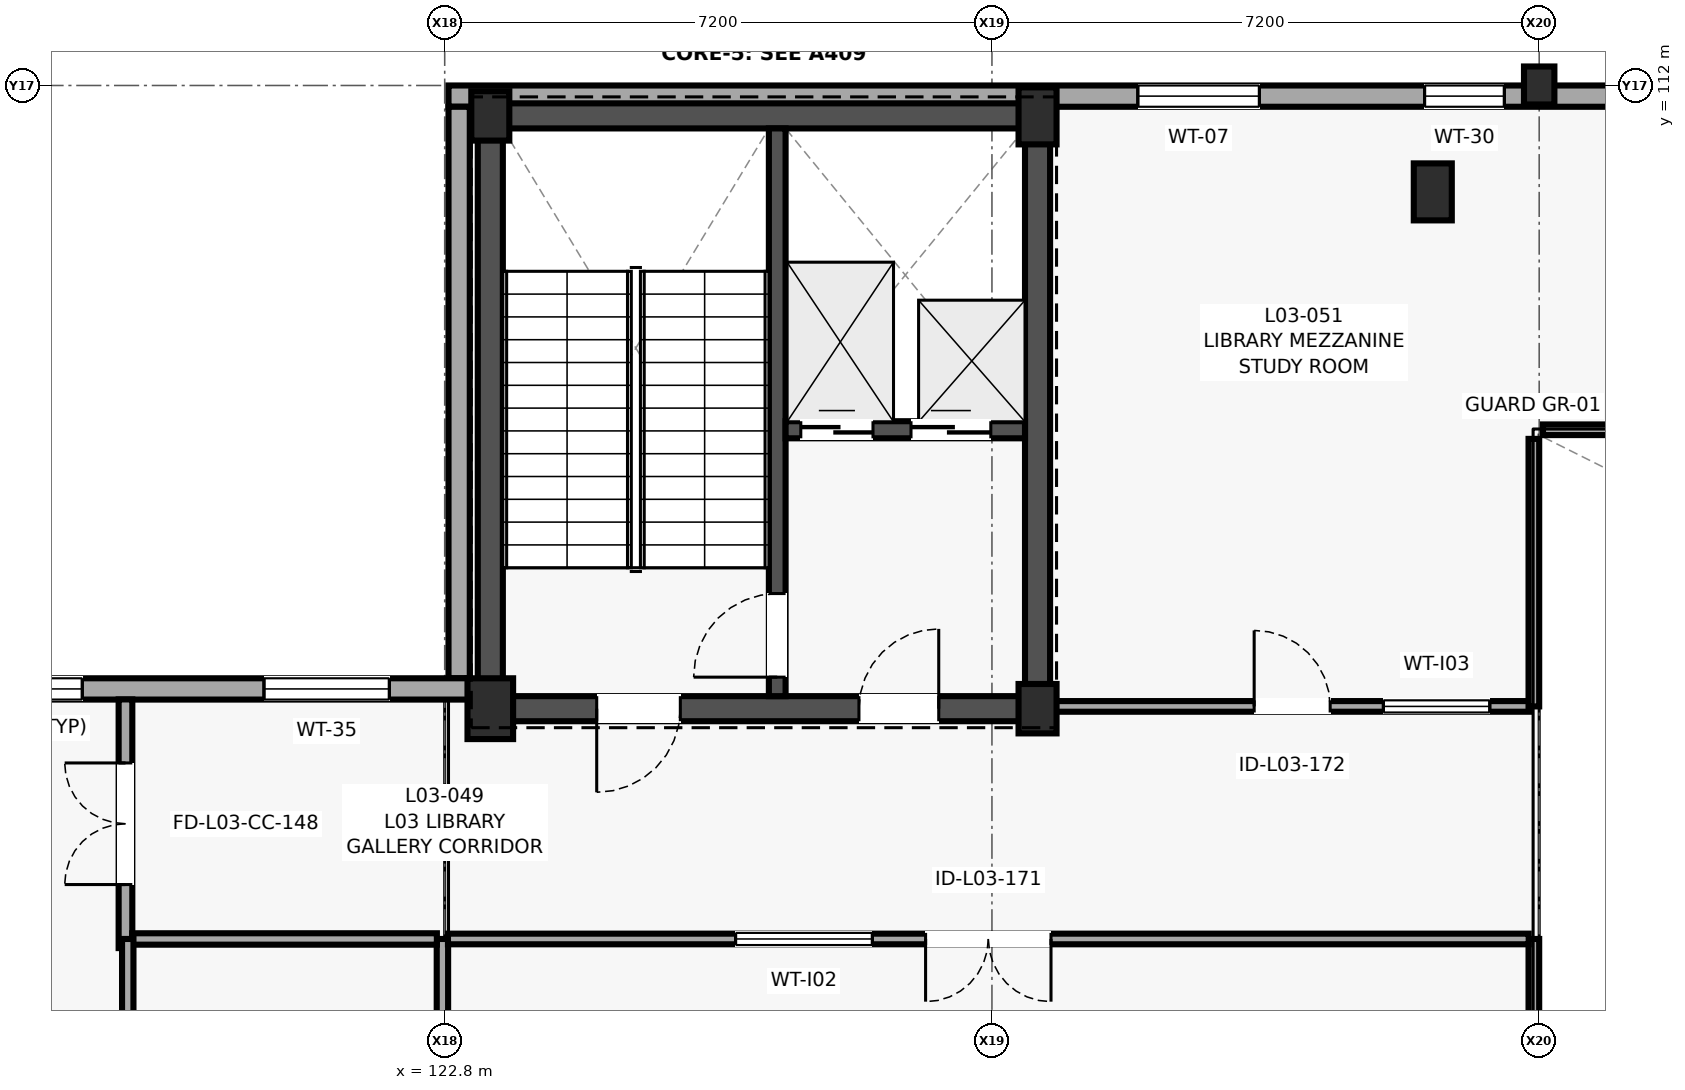
"""IFC4 building model, lengths in metres.
Left out: names, types, materials, properties, quantities, classifications, styles, units other than length and angle.
Written with IfcOpenShell. Run it as: python <this file> out.ifc"""

import sys

from ifc_helpers import new_model, si_unit, direction, frame, frame_2d, origin, origin_2d, place, context, subcontext, project, spatial, rectangle, extrude, element, fill, save


model = new_model("IFC4")
c1 = context("Model", 3, precision=1e-05, world=origin(), true_north=direction((0.0, 1.0)))
c2 = subcontext(c1, "Body", "Model", "MODEL_VIEW")
j1 = project(units=[si_unit("LENGTHUNIT", "METRE"), si_unit("PLANEANGLEUNIT", "RADIAN")], contexts=[c1])
p1 = place(None, origin())
s1 = spatial("IfcSite", under=j1, at=p1, CompositionType="ELEMENT")
p2 = place(p1, origin())
s2 = spatial("IfcBuilding", under=s1, at=p2, CompositionType="ELEMENT")
p3 = place(p2, frame((0.0, 0.0, 12.2)))
s3 = spatial("IfcBuildingStorey", under=s2, at=p3, CompositionType="ELEMENT", Elevation=12.2)
p4 = place(p3, frame((123.4, 103.8, 0.0), z_axis=(0.0, 0.0, 1.0), x_axis=(1.0, 0.0, 0.0)))
e1 = element("IfcColumn", 1, at=p4, inside=s3, PredefinedType="COLUMN", context=c2, shape_type="SweptSolid", body=[
    extrude(rectangle(XDim=0.6, YDim=0.8, at=origin_2d()), origin(), (0.0, 0.0, 1.0), 4.0),
])
for number, where, z_axis, x_axis in (
    (2, (123.4, 111.6, 0.0), (0.0, 0.0, 1.0), (1.0, 0.0, 0.0)),
    (3, (130.6, 103.8, 0.0), (0.0, 0.0, 1.0), (1.0, 0.0, 0.0)),
):
    element("IfcColumn", number, at=place(p3, frame(where, z_axis=z_axis, x_axis=x_axis)), inside=s3, PredefinedType="COLUMN", context=c2, shape_type="SweptSolid", body=[
        extrude(rectangle(XDim=0.5, YDim=0.65, at=origin_2d()), origin(), (0.0, 0.0, 1.0), 4.0),
    ])
for number, where, z_axis, x_axis in (
    (4, (130.6, 111.6, 0.0), (0.0, 0.0, 1.0), (1.0, 0.0, 0.0)),
    (5, (135.8, 110.6, 0.0), (0.0, 0.0, 1.0), (1.0, 0.0, 0.0)),
):
    element("IfcColumn", number, at=place(p3, frame(where, z_axis=z_axis, x_axis=x_axis)), inside=s3, PredefinedType="COLUMN", context=c2, shape_type="SweptSolid", body=[
        extrude(rectangle(XDim=0.5, YDim=0.75, at=origin_2d()), origin(), (0.0, 0.0, 1.0), 4.0),
    ])
p5 = place(p3, frame((137.2, 112.0, 0.0), z_axis=(0.0, 0.0, 1.0), x_axis=(1.0, 0.0, 0.0)))
e6 = element("IfcColumn", 6, at=p5, inside=s3, PredefinedType="PILASTER", context=c2, shape_type="SweptSolid", body=[
    extrude(rectangle(XDim=0.4, YDim=0.5, at=origin_2d()), origin(), (0.0, 0.0, 1.0), 4.0),
])
p6 = place(p3, frame((138.641, 111.86, 0.0), z_axis=(0.0, 0.0, 1.0), x_axis=(-1.0, 0.0, 0.0)))
e7 = element("IfcWall", 7, at=p6, inside=s3, PredefinedType="SOLIDWALL", context=c2, shape_type="SweptSolid", body=[
    extrude(rectangle(XDim=15.791, YDim=0.28, at=frame_2d((7.896, 0.0))), origin(), (0.0, 0.0, 1.0), 3.115),
])
p7 = place(p6, frame((1.899, 0.0, 1.05)))
e8 = element("IfcOpeningElement", 8, at=p7, cuts=e7, PredefinedType="OPENING", context=c2, shape_type="SweptSolid", body=[
    extrude(rectangle(XDim=1.05, YDim=1.3, at=frame_2d((0.525, 0.65))), frame((0.0, 0.15, 0.0), z_axis=(0.0, -1.0, 0.0), x_axis=(1.0, 0.0, 0.0)), (0.0, 0.0, 1.0), 0.3),
])
p8 = place(p6, frame((5.122, 0.0, 1.05)))
e9 = element("IfcOpeningElement", 9, at=p8, cuts=e7, PredefinedType="OPENING", context=c2, shape_type="SweptSolid", body=[
    extrude(rectangle(XDim=1.6, YDim=1.35, at=frame_2d((0.8, 0.675))), frame((0.0, 0.15, 0.0), z_axis=(0.0, -1.0, 0.0), x_axis=(1.0, 0.0, 0.0)), (0.0, 0.0, 1.0), 0.3),
])
p9 = place(p3, frame((122.99, 111.72, 0.0), z_axis=(0.0, 0.0, 1.0), x_axis=(0.0, -1.0, 0.0)))
e10 = element("IfcWall", 10, at=p9, inside=s3, PredefinedType="SOLIDWALL", context=c2, shape_type="SweptSolid", body=[
    extrude(rectangle(XDim=7.52, YDim=0.28, at=frame_2d((3.76, 0.0))), origin(), (0.0, 0.0, 1.0), 3.78),
])
p10 = place(p3, frame((123.13, 104.06, 0.0), z_axis=(0.0, 0.0, 1.0), x_axis=(-1.0, 0.0, 0.0)))
e11 = element("IfcWall", 11, at=p10, inside=s3, PredefinedType="SOLIDWALL", context=c2, shape_type="SweptSolid", body=[
    extrude(rectangle(XDim=7.53, YDim=0.28, at=frame_2d((3.765, 0.0))), origin(), (0.0, 0.0, 1.0), 3.78),
])
p11 = place(p10, frame((1.058, 0.0, 1.05)))
e12 = element("IfcOpeningElement", 12, at=p11, cuts=e11, PredefinedType="OPENING", context=c2, shape_type="SweptSolid", body=[
    extrude(rectangle(XDim=1.65, YDim=1.25, at=frame_2d((0.825, 0.625))), frame((0.0, 0.15, 0.0), z_axis=(0.0, -1.0, 0.0), x_axis=(1.0, 0.0, 0.0)), (0.0, 0.0, 1.0), 0.3),
])
p12 = place(p10, frame((5.098, 0.0, 0.75)))
e13 = element("IfcOpeningElement", 13, at=p12, cuts=e11, PredefinedType="OPENING", context=c2, shape_type="SweptSolid", body=[
    extrude(rectangle(XDim=1.1, YDim=2.1, at=frame_2d((0.55, 1.05))), frame((0.0, 0.15, 0.0), z_axis=(0.0, -1.0, 0.0), x_axis=(1.0, 0.0, 0.0)), (0.0, 0.0, 1.0), 0.3),
])
p13 = place(p3, frame((123.235, 103.8, 0.0), z_axis=(0.0, 0.0, 1.0), x_axis=(1.0, 0.0, 0.0)))
e14 = element("IfcWall", 14, at=p13, inside=s3, PredefinedType="SHEAR", context=c2, shape_type="SweptSolid", body=[
    extrude(rectangle(XDim=7.53, YDim=0.33, at=frame_2d((3.765, 0.0))), origin(), (0.0, 0.0, 1.0), 3.78),
])
p14 = place(p13, frame((5.015, 0.0, 0.0)))
e15 = element("IfcOpeningElement", 15, at=p14, cuts=e14, PredefinedType="OPENING", context=c2, shape_type="SweptSolid", body=[
    extrude(rectangle(XDim=1.05, YDim=2.15, at=frame_2d((0.525, 1.075))), frame((0.0, 0.175, 0.0), z_axis=(0.0, -1.0, 0.0), x_axis=(1.0, 0.0, 0.0)), (0.0, 0.0, 1.0), 0.35),
])
p15 = place(p13, frame((1.565, 0.0, 0.0)))
e16 = element("IfcOpeningElement", 16, at=p15, cuts=e14, PredefinedType="OPENING", context=c2, shape_type="SweptSolid", body=[
    extrude(rectangle(XDim=1.1, YDim=2.15, at=frame_2d((0.55, 1.075))), frame((0.0, 0.175, 0.0), z_axis=(0.0, -1.0, 0.0), x_axis=(1.0, 0.0, 0.0)), (0.0, 0.0, 1.0), 0.35),
])
p16 = place(p3, frame((123.235, 111.6, 0.0), z_axis=(0.0, 0.0, 1.0), x_axis=(1.0, 0.0, 0.0)))
e17 = element("IfcWall", 17, at=p16, inside=s3, PredefinedType="SHEAR", context=c2, shape_type="SweptSolid", body=[
    extrude(rectangle(XDim=7.53, YDim=0.33, at=frame_2d((3.765, 0.0))), origin(), (0.0, 0.0, 1.0), 3.78),
])
for number, where, z_axis, x_axis in (
    (18, (123.4, 103.965, 0.0), (0.0, 0.0, 1.0), (0.0, 1.0, 0.0)),
    (19, (130.6, 103.965, 0.0), (0.0, 0.0, 1.0), (0.0, 1.0, 0.0)),
):
    element("IfcWall", number, at=place(p3, frame(where, z_axis=z_axis, x_axis=x_axis)), inside=s3, PredefinedType="SHEAR", context=c2, shape_type="SweptSolid", body=[
        extrude(rectangle(XDim=7.47, YDim=0.33, at=frame_2d((3.735, 0.0))), origin(), (0.0, 0.0, 1.0), 3.78),
    ])
p17 = place(p3, frame((127.175, 103.965, 0.0), z_axis=(0.0, 0.0, 1.0), x_axis=(0.0, 1.0, 0.0)))
e20 = element("IfcWall", 20, at=p17, inside=s3, PredefinedType="SHEAR", context=c2, shape_type="SweptSolid", body=[
    extrude(rectangle(XDim=7.47, YDim=0.22, at=frame_2d((3.735, 0.0))), origin(), (0.0, 0.0, 1.0), 3.78),
])
p18 = place(p17, frame((0.25, 0.0, 0.0)))
e21 = element("IfcOpeningElement", 21, at=p18, cuts=e20, PredefinedType="OPENING", context=c2, shape_type="SweptSolid", body=[
    extrude(rectangle(XDim=1.1, YDim=2.15, at=frame_2d((0.55, 1.075))), frame((0.0, 0.12, 0.0), z_axis=(0.0, -1.0, 0.0), x_axis=(1.0, 0.0, 0.0)), (0.0, 0.0, 1.0), 0.24),
])
p19 = place(p3, frame((127.285, 107.47, 0.0), z_axis=(0.0, 0.0, 1.0), x_axis=(1.0, 0.0, 0.0)))
e22 = element("IfcWall", 22, at=p19, inside=s3, PredefinedType="SHEAR", context=c2, shape_type="SweptSolid", body=[
    extrude(rectangle(XDim=3.15, YDim=0.225, at=frame_2d((1.575, 0.0))), origin(), (0.0, 0.0, 1.0), 3.78),
])
p20 = place(p19, frame((0.2, 0.0, 0.0)))
e23 = element("IfcOpeningElement", 23, at=p20, cuts=e22, PredefinedType="OPENING", context=c2, shape_type="SweptSolid", body=[
    extrude(rectangle(XDim=0.95, YDim=2.15, at=frame_2d((0.475, 1.075))), frame((0.0, 0.123, 0.0), z_axis=(0.0, -1.0, 0.0), x_axis=(1.0, 0.0, 0.0)), (0.0, 0.0, 1.0), 0.245),
])
p21 = place(p19, frame((1.65, 0.0, 0.0)))
e24 = element("IfcOpeningElement", 24, at=p21, cuts=e22, PredefinedType="OPENING", context=c2, shape_type="SweptSolid", body=[
    extrude(rectangle(XDim=1.05, YDim=2.2, at=frame_2d((0.525, 1.1))), frame((0.0, 0.123, 0.0), z_axis=(0.0, -1.0, 0.0), x_axis=(1.0, 0.0, 0.0)), (0.0, 0.0, 1.0), 0.245),
])
p22 = place(p3, frame((118.6, 100.65, 0.0), z_axis=(0.0, 0.0, 1.0), x_axis=(0.0, 1.0, 0.0)))
e25 = element("IfcWall", 25, at=p22, inside=s3, PredefinedType="PARTITIONING", context=c2, shape_type="SweptSolid", body=[
    extrude(rectangle(XDim=3.272, YDim=0.18, at=frame_2d((1.636, 0.0))), origin(), (0.0, 0.0, 1.0), 3.78),
])
p23 = place(p22, frame((0.836, 0.0, 0.0)))
e26 = element("IfcOpeningElement", 26, at=p23, cuts=e25, PredefinedType="OPENING", context=c2, shape_type="SweptSolid", body=[
    extrude(rectangle(XDim=1.6, YDim=2.25, at=frame_2d((0.8, 1.125))), frame((0.0, 0.1, 0.0), z_axis=(0.0, -1.0, 0.0), x_axis=(1.0, 0.0, 0.0)), (0.0, 0.0, 1.0), 0.2),
])
p24 = place(p3, frame((122.77, 96.678, 0.0), z_axis=(0.0, 0.0, 1.0), x_axis=(0.0, 1.0, 0.0)))
e27 = element("IfcWall", 27, at=p24, inside=s3, PredefinedType="PARTITIONING", context=c2, shape_type="SweptSolid", body=[
    extrude(rectangle(XDim=4.092, YDim=0.15, at=frame_2d((2.046, 0.0))), origin(), (0.0, 0.0, 1.0), 3.715),
])
p25 = place(p3, frame((122.697, 100.77, 0.0), z_axis=(0.0, 0.0, 1.0), x_axis=(-1.0, 0.0, 0.0)))
e28 = element("IfcWall", 28, at=p25, inside=s3, PredefinedType="PARTITIONING", context=c2, shape_type="SweptSolid", body=[
    extrude(rectangle(XDim=4.009, YDim=0.15, at=frame_2d((2.004, 0.0))), origin(), (0.0, 0.0, 1.0), 3.715),
])
p26 = place(p3, frame((118.63, 100.77, 0.0), z_axis=(0.0, 0.0, 1.0), x_axis=(0.0, -1.0, 0.0)))
e29 = element("IfcWall", 29, at=p26, inside=s3, PredefinedType="PARTITIONING", context=c2, shape_type="SweptSolid", body=[
    extrude(rectangle(XDim=10.922, YDim=0.15, at=frame_2d((5.461, 0.0))), origin(), (0.0, 0.0, 1.0), 3.165),
])
p27 = place(p26, frame((4.886, 0.0, 0.0)))
e30 = element("IfcOpeningElement", 30, at=p27, cuts=e29, PredefinedType="OPENING", context=c2, shape_type="SweptSolid", body=[
    extrude(rectangle(XDim=1.15, YDim=2.2, at=frame_2d((0.575, 1.1))), frame((0.0, 0.085, 0.0), z_axis=(0.0, -1.0, 0.0), x_axis=(1.0, 0.0, 0.0)), (0.0, 0.0, 1.0), 0.17),
])
p28 = place(p3, frame((137.13, 98.45, 0.0), z_axis=(0.0, 0.0, 1.0), x_axis=(0.0, 1.0, 0.0)))
e31 = element("IfcWall", 31, at=p28, inside=s3, PredefinedType="PARTITIONING", context=c2, shape_type="SweptSolid", body=[
    extrude(rectangle(XDim=2.32, YDim=0.14, at=frame_2d((1.16, 0.0))), origin(), (0.0, 0.0, 1.0), 3.165),
])
p29 = place(p3, frame((137.062, 100.77, 0.0), z_axis=(0.0, 0.0, 1.0), x_axis=(-1.0, 0.0, 0.0)))
e32 = element("IfcWall", 32, at=p29, inside=s3, PredefinedType="PARTITIONING", context=c2, shape_type="SweptSolid", body=[
    extrude(rectangle(XDim=14.219, YDim=0.14, at=frame_2d((7.109, 0.0))), origin(), (0.0, 0.0, 1.0), 3.715),
])
p30 = place(p29, frame((6.285, 0.0, 0.0)))
e33 = element("IfcOpeningElement", 33, at=p30, cuts=e32, PredefinedType="OPENING", context=c2, shape_type="SweptSolid", body=[
    extrude(rectangle(XDim=1.65, YDim=2.32, at=frame_2d((0.825, 1.16))), frame((0.0, 0.08, 0.0), z_axis=(0.0, -1.0, 0.0), x_axis=(1.0, 0.0, 0.0)), (0.0, 0.0, 1.0), 0.16),
])
p31 = place(p29, frame((8.635, 0.0, 1.05)))
e34 = element("IfcOpeningElement", 34, at=p31, cuts=e32, PredefinedType="OPENING", context=c2, shape_type="SweptSolid", body=[
    extrude(rectangle(XDim=1.8, YDim=1.2, at=frame_2d((0.9, 0.6))), frame((0.0, 0.08, 0.0), z_axis=(0.0, -1.0, 0.0), x_axis=(1.0, 0.0, 0.0)), (0.0, 0.0, 1.0), 0.16),
])
p32 = place(p3, frame((130.83, 103.83, 0.0), z_axis=(0.0, 0.0, 1.0), x_axis=(1.0, 0.0, 0.0)))
e35 = element("IfcWall", 35, at=p32, inside=s3, PredefinedType="PARTITIONING", context=c2, shape_type="SweptSolid", body=[
    extrude(rectangle(XDim=6.24, YDim=0.14, at=frame_2d((3.12, 0.0))), origin(), (0.0, 0.0, 1.0), 3.715),
])
p33 = place(p32, frame((2.62, 0.0, 0.0)))
e36 = element("IfcOpeningElement", 36, at=p33, cuts=e35, PredefinedType="OPENING", context=c2, shape_type="SweptSolid", body=[
    extrude(rectangle(XDim=1.0, YDim=2.1, at=frame_2d((0.5, 1.05))), frame((0.0, 0.08, 0.0), z_axis=(0.0, -1.0, 0.0), x_axis=(1.0, 0.0, 0.0)), (0.0, 0.0, 1.0), 0.16),
])
p34 = place(p32, frame((4.32, 0.0, 1.05)))
e37 = element("IfcOpeningElement", 37, at=p34, cuts=e35, PredefinedType="OPENING", context=c2, shape_type="SweptSolid", body=[
    extrude(rectangle(XDim=1.4, YDim=1.05, at=frame_2d((0.7, 0.525))), frame((0.0, 0.08, 0.0), z_axis=(0.0, -1.0, 0.0), x_axis=(1.0, 0.0, 0.0)), (0.0, 0.0, 1.0), 0.16),
])
p35 = place(p3, frame((137.13, 103.83, 0.0), z_axis=(0.0, 0.0, 1.0), x_axis=(0.0, 1.0, 0.0)))
e38 = element("IfcWall", 38, at=p35, inside=s3, PredefinedType="PARTITIONING", context=c2, shape_type="SweptSolid", body=[
    extrude(rectangle(XDim=3.52, YDim=0.14, at=frame_2d((1.76, 0.0))), origin(), (0.0, 0.0, 1.0), 3.165),
])
p36 = place(p3, frame((137.25, 107.47, 0.0), z_axis=(0.0, 0.0, 1.0), x_axis=(1.0, 0.0, 0.0)))
e39 = element("IfcWall", 39, at=p36, inside=s3, PredefinedType="PARTITIONING", context=c2, shape_type="SweptSolid", body=[
    extrude(rectangle(XDim=17.9, YDim=0.14, at=frame_2d((8.95, 0.0))), origin(), (0.0, 0.0, 1.0), 3.715),
])
p37 = place(p7, origin())
e40 = element("IfcWindow", 40, at=p37, inside=s3, PartitioningType="SINGLE_PANEL", PredefinedType="WINDOW", context=c2, shape_type="SweptSolid", body=[
    extrude(rectangle(XDim=1.05, YDim=1.3, at=frame_2d((0.525, 0.65))), frame((0.0, 0.03, 0.0), z_axis=(0.0, -1.0, 0.0), x_axis=(1.0, 0.0, 0.0)), (0.0, 0.0, 1.0), 0.06),
])
fill(e8, e40)
p38 = place(p8, origin())
e41 = element("IfcWindow", 41, at=p38, inside=s3, PartitioningType="SINGLE_PANEL", PredefinedType="WINDOW", context=c2, shape_type="SweptSolid", body=[
    extrude(rectangle(XDim=1.6, YDim=1.35, at=frame_2d((0.8, 0.675))), frame((0.0, 0.03, 0.0), z_axis=(0.0, -1.0, 0.0), x_axis=(1.0, 0.0, 0.0)), (0.0, 0.0, 1.0), 0.06),
])
fill(e9, e41)
p39 = place(p11, origin())
e42 = element("IfcWindow", 42, at=p39, inside=s3, PartitioningType="SINGLE_PANEL", PredefinedType="WINDOW", context=c2, shape_type="SweptSolid", body=[
    extrude(rectangle(XDim=1.65, YDim=1.25, at=frame_2d((0.825, 0.625))), frame((0.0, 0.03, 0.0), z_axis=(0.0, -1.0, 0.0), x_axis=(1.0, 0.0, 0.0)), (0.0, 0.0, 1.0), 0.06),
])
fill(e12, e42)
p40 = place(p12, origin())
e43 = element("IfcWindow", 43, at=p40, inside=s3, PartitioningType="SINGLE_PANEL", PredefinedType="WINDOW", context=c2, shape_type="SweptSolid", body=[
    extrude(rectangle(XDim=1.1, YDim=2.1, at=frame_2d((0.55, 1.05))), frame((0.0, 0.03, 0.0), z_axis=(0.0, -1.0, 0.0), x_axis=(1.0, 0.0, 0.0)), (0.0, 0.0, 1.0), 0.06),
])
fill(e13, e43)
p41 = place(p20, origin())
e44 = element("IfcDoor", 44, at=p41, inside=s3, OperationType="SLIDING_TO_LEFT", PredefinedType="DOOR", context=c2, shape_type="SweptSolid", body=[
    extrude(rectangle(XDim=0.95, YDim=2.15, at=frame_2d((0.475, 1.075))), frame((0.0, 0.025, 0.0), z_axis=(0.0, -1.0, 0.0), x_axis=(1.0, 0.0, 0.0)), (0.0, 0.0, 1.0), 0.05),
])
fill(e23, e44)
p42 = place(p21, origin())
e45 = element("IfcDoor", 45, at=p42, inside=s3, OperationType="SLIDING_TO_RIGHT", PredefinedType="DOOR", context=c2, shape_type="SweptSolid", body=[
    extrude(rectangle(XDim=1.05, YDim=2.2, at=frame_2d((0.525, 1.1))), frame((0.0, 0.025, 0.0), z_axis=(0.0, -1.0, 0.0), x_axis=(1.0, 0.0, 0.0)), (0.0, 0.0, 1.0), 0.05),
])
fill(e24, e45)
p43 = place(p18, origin())
e46 = element("IfcDoor", 46, at=p43, inside=s3, OperationType="SINGLE_SWING_LEFT", PredefinedType="DOOR", context=c2, shape_type="SweptSolid", body=[
    extrude(rectangle(XDim=1.1, YDim=2.15, at=frame_2d((0.55, 1.075))), frame((0.0, 0.025, 0.0), z_axis=(0.0, -1.0, 0.0), x_axis=(1.0, 0.0, 0.0)), (0.0, 0.0, 1.0), 0.05),
])
fill(e21, e46)
p44 = place(p14, origin())
e47 = element("IfcDoor", 47, at=p44, inside=s3, OperationType="SINGLE_SWING_RIGHT", PredefinedType="DOOR", context=c2, shape_type="SweptSolid", body=[
    extrude(rectangle(XDim=1.05, YDim=2.15, at=frame_2d((0.525, 1.075))), frame((0.0, 0.025, 0.0), z_axis=(0.0, -1.0, 0.0), x_axis=(1.0, 0.0, 0.0)), (0.0, 0.0, 1.0), 0.05),
])
fill(e15, e47)
p45 = place(p15, frame((1.1, 0.0, 0.0), z_axis=(0.0, 0.0, 1.0), x_axis=(-1.0, 0.0, 0.0)))
e48 = element("IfcDoor", 48, at=p45, inside=s3, OperationType="SINGLE_SWING_LEFT", PredefinedType="DOOR", context=c2, shape_type="SweptSolid", body=[
    extrude(rectangle(XDim=1.1, YDim=2.15, at=frame_2d((0.55, 1.075))), frame((0.0, 0.025, 0.0), z_axis=(0.0, -1.0, 0.0), x_axis=(1.0, 0.0, 0.0)), (0.0, 0.0, 1.0), 0.05),
])
fill(e16, e48)
p46 = place(p23, origin())
e49 = element("IfcDoor", 49, at=p46, inside=s3, OperationType="DOUBLE_DOOR_SINGLE_SWING", PredefinedType="DOOR", context=c2, shape_type="SweptSolid", body=[
    extrude(rectangle(XDim=1.6, YDim=2.25, at=frame_2d((0.8, 1.125))), frame((0.0, 0.025, 0.0), z_axis=(0.0, -1.0, 0.0), x_axis=(1.0, 0.0, 0.0)), (0.0, 0.0, 1.0), 0.05),
])
fill(e26, e49)
p47 = place(p30, origin())
e50 = element("IfcDoor", 50, at=p47, inside=s3, OperationType="DOUBLE_DOOR_SINGLE_SWING", PredefinedType="DOOR", context=c2, shape_type="SweptSolid", body=[
    extrude(rectangle(XDim=1.65, YDim=2.32, at=frame_2d((0.825, 1.16))), frame((0.0, 0.025, 0.0), z_axis=(0.0, -1.0, 0.0), x_axis=(1.0, 0.0, 0.0)), (0.0, 0.0, 1.0), 0.05),
])
fill(e33, e50)
p48 = place(p31, origin())
e51 = element("IfcWindow", 51, at=p48, inside=s3, PartitioningType="SINGLE_PANEL", PredefinedType="WINDOW", context=c2, shape_type="SweptSolid", body=[
    extrude(rectangle(XDim=1.8, YDim=1.2, at=frame_2d((0.9, 0.6))), frame((0.0, 0.03, 0.0), z_axis=(0.0, -1.0, 0.0), x_axis=(1.0, 0.0, 0.0)), (0.0, 0.0, 1.0), 0.06),
])
fill(e34, e51)
p49 = place(p33, origin())
e52 = element("IfcDoor", 52, at=p49, inside=s3, OperationType="SINGLE_SWING_LEFT", PredefinedType="DOOR", context=c2, shape_type="SweptSolid", body=[
    extrude(rectangle(XDim=1.0, YDim=2.1, at=frame_2d((0.5, 1.05))), frame((0.0, 0.025, 0.0), z_axis=(0.0, -1.0, 0.0), x_axis=(1.0, 0.0, 0.0)), (0.0, 0.0, 1.0), 0.05),
])
fill(e36, e52)
p50 = place(p34, origin())
e53 = element("IfcWindow", 53, at=p50, inside=s3, PartitioningType="SINGLE_PANEL", PredefinedType="WINDOW", context=c2, shape_type="SweptSolid", body=[
    extrude(rectangle(XDim=1.4, YDim=1.05, at=frame_2d((0.7, 0.525))), frame((0.0, 0.03, 0.0), z_axis=(0.0, -1.0, 0.0), x_axis=(1.0, 0.0, 0.0)), (0.0, 0.0, 1.0), 0.06),
])
fill(e37, e53)
save(model, sys.argv[1])
